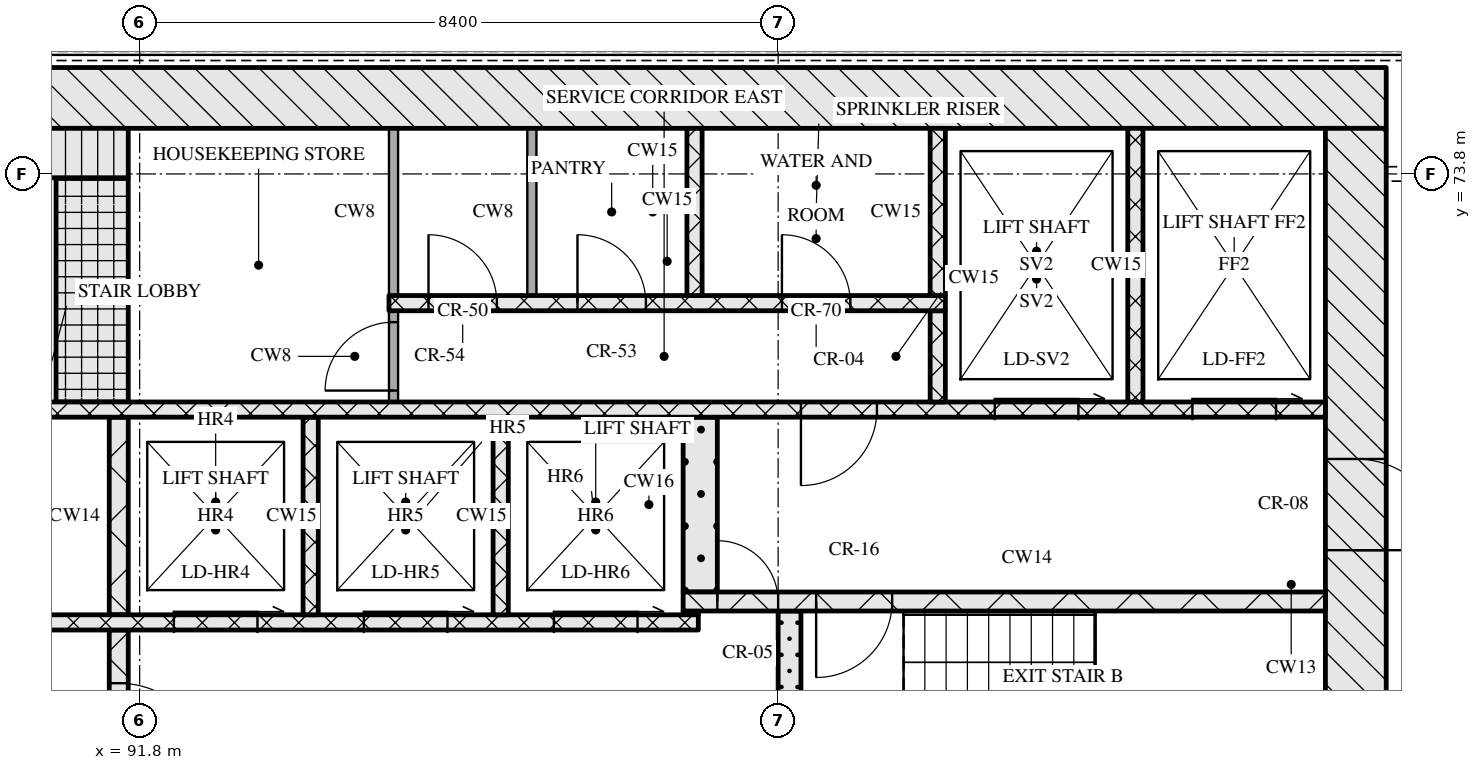
"""IFC4 building model, lengths in metres.
Left out: names, types, materials, properties, quantities, classifications, styles, units other than length and angle.
Written with IfcOpenShell. Run it as: python <this file> out.ifc"""

import sys

from ifc_helpers import new_model, si_unit, direction, frame, frame_2d, origin, place, context, subcontext, project, spatial, rectangle, extrude, element, fill, save


model = new_model("IFC4")
c1 = context("Model", 3, precision=1e-05, world=origin(), true_north=direction((0.0, 1.0)))
c2 = subcontext(c1, "Body", "Model", "MODEL_VIEW")
j1 = project(units=[si_unit("LENGTHUNIT", "METRE"), si_unit("PLANEANGLEUNIT", "RADIAN")], contexts=[c1])
p1 = place(None, origin())
s1 = spatial("IfcSite", under=j1, at=p1, CompositionType="ELEMENT")
p2 = place(p1, origin())
s2 = spatial("IfcBuilding", under=s1, at=p2, CompositionType="ELEMENT")
p3 = place(p2, frame((0.0, 0.0, 172.65)))
s3 = spatial("IfcBuildingStorey", under=s2, at=p3, CompositionType="ELEMENT", Elevation=172.65)
p4 = place(p3, frame((67.0, 74.8, 0.0), z_axis=(0.0, 0.0, 1.0), x_axis=(1.0, 0.0, 0.0)))
e1 = element("IfcWall", 1, at=p4, inside=s3, PredefinedType="SOLIDWALL", context=c2, shape_type="SweptSolid", body=[
    extrude(rectangle(XDim=41.2, YDim=0.8, at=frame_2d((20.6, 0.0))), origin(), (0.0, 0.0, 1.0), 3.32),
])
p5 = place(p3, frame((107.8, 62.4, 0.0), z_axis=(0.0, 0.0, 1.0), x_axis=(0.0, 1.0, 0.0)))
e2 = element("IfcWall", 2, at=p5, inside=s3, PredefinedType="SOLIDWALL", context=c2, shape_type="SweptSolid", body=[
    extrude(rectangle(XDim=12.0, YDim=0.8, at=frame_2d((6.0, 0.0))), origin(), (0.0, 0.0, 1.0), 3.32),
])
p6 = place(p5, frame((6.45, 0.0, 0.0)))
e3 = element("IfcOpeningElement", 3, at=p6, cuts=e2, PredefinedType="OPENING", context=c2, shape_type="SweptSolid", body=[
    extrude(rectangle(XDim=1.2, YDim=2.1, at=frame_2d((0.6, 1.05))), frame((0.0, 0.41, 0.0), z_axis=(0.0, -1.0, 0.0), x_axis=(1.0, 0.0, 0.0)), (0.0, 0.0, 1.0), 0.82),
])
p7 = place(p3, frame((91.525, 65.2, 0.0), z_axis=(0.0, 0.0, 1.0), x_axis=(0.0, 1.0, 0.0)))
e4 = element("IfcWall", 4, at=p7, inside=s3, PredefinedType="SOLIDWALL", context=c2, shape_type="SweptSolid", body=[
    extrude(rectangle(XDim=2.6, YDim=0.25, at=frame_2d((1.3, 0.0))), origin(), (0.0, 0.0, 1.0), 3.32),
])
p8 = place(p7, frame((0.7, 0.0, 0.0)))
e5 = element("IfcOpeningElement", 5, at=p8, cuts=e4, PredefinedType="OPENING", context=c2, shape_type="SweptSolid", body=[
    extrude(rectangle(XDim=1.2, YDim=2.1, at=frame_2d((0.6, 1.05))), frame((0.0, 0.135, 0.0), z_axis=(0.0, -1.0, 0.0), x_axis=(1.0, 0.0, 0.0)), (0.0, 0.0, 1.0), 0.27),
])
p9 = place(p3, frame((100.35, 65.2, 0.0), z_axis=(0.0, 0.0, 1.0), x_axis=(0.0, 1.0, 0.0)))
e6 = element("IfcWall", 6, at=p9, inside=s3, PredefinedType="SOLIDWALL", context=c2, shape_type="SweptSolid", body=[
    extrude(rectangle(XDim=2.85, YDim=0.3, at=frame_2d((1.425, 0.0))), origin(), (0.0, 0.0, 1.0), 3.32),
])
p10 = place(p3, frame((76.05, 67.9, 0.0), z_axis=(0.0, 0.0, 1.0), x_axis=(1.0, 0.0, 0.0)))
e7 = element("IfcWall", 7, at=p10, inside=s3, PredefinedType="SOLIDWALL", context=c2, shape_type="SweptSolid", body=[
    extrude(rectangle(XDim=23.1, YDim=0.2, at=frame_2d((11.55, 0.0))), origin(), (0.0, 0.0, 1.0), 3.32),
])
p11 = place(p10, frame((1.35, 0.0, 0.0)))
e8 = element("IfcOpeningElement", 8, at=p11, cuts=e7, PredefinedType="OPENING", context=c2, shape_type="SweptSolid", body=[
    extrude(rectangle(XDim=0.9, YDim=2.1, at=frame_2d((0.45, 1.05))), frame((0.0, 0.11, 0.0), z_axis=(0.0, -1.0, 0.0), x_axis=(1.0, 0.0, 0.0)), (0.0, 0.0, 1.0), 0.22),
])
p12 = place(p10, frame((5.06, 0.0, 0.0)))
e9 = element("IfcOpeningElement", 9, at=p12, cuts=e7, PredefinedType="OPENING", context=c2, shape_type="SweptSolid", body=[
    extrude(rectangle(XDim=0.9, YDim=2.1, at=frame_2d((0.45, 1.05))), frame((0.0, 0.11, 0.0), z_axis=(0.0, -1.0, 0.0), x_axis=(1.0, 0.0, 0.0)), (0.0, 0.0, 1.0), 0.22),
])
p13 = place(p10, frame((8.45, 0.0, 0.0)))
e10 = element("IfcOpeningElement", 10, at=p13, cuts=e7, PredefinedType="OPENING", context=c2, shape_type="SweptSolid", body=[
    extrude(rectangle(XDim=0.9, YDim=2.1, at=frame_2d((0.45, 1.05))), frame((0.0, 0.11, 0.0), z_axis=(0.0, -1.0, 0.0), x_axis=(1.0, 0.0, 0.0)), (0.0, 0.0, 1.0), 0.22),
])
p14 = place(p10, frame((10.91, 0.0, 0.0)))
e11 = element("IfcOpeningElement", 11, at=p14, cuts=e7, PredefinedType="OPENING", context=c2, shape_type="SweptSolid", body=[
    extrude(rectangle(XDim=0.9, YDim=2.1, at=frame_2d((0.45, 1.05))), frame((0.0, 0.11, 0.0), z_axis=(0.0, -1.0, 0.0), x_axis=(1.0, 0.0, 0.0)), (0.0, 0.0, 1.0), 0.22),
])
p15 = place(p10, frame((13.55, 0.0, 0.0)))
e12 = element("IfcOpeningElement", 12, at=p15, cuts=e7, PredefinedType="OPENING", context=c2, shape_type="SweptSolid", body=[
    extrude(rectangle(XDim=1.0, YDim=2.1, at=frame_2d((0.5, 1.05))), frame((0.0, 0.11, 0.0), z_axis=(0.0, -1.0, 0.0), x_axis=(1.0, 0.0, 0.0)), (0.0, 0.0, 1.0), 0.22),
])
p16 = place(p10, frame((16.2, 0.0, 0.0)))
e13 = element("IfcOpeningElement", 13, at=p16, cuts=e7, PredefinedType="OPENING", context=c2, shape_type="SweptSolid", body=[
    extrude(rectangle(XDim=1.1, YDim=2.1, at=frame_2d((0.55, 1.05))), frame((0.0, 0.11, 0.0), z_axis=(0.0, -1.0, 0.0), x_axis=(1.0, 0.0, 0.0)), (0.0, 0.0, 1.0), 0.22),
])
p17 = place(p10, frame((18.7, 0.0, 0.0)))
e14 = element("IfcOpeningElement", 14, at=p17, cuts=e7, PredefinedType="OPENING", context=c2, shape_type="SweptSolid", body=[
    extrude(rectangle(XDim=1.1, YDim=2.1, at=frame_2d((0.55, 1.05))), frame((0.0, 0.11, 0.0), z_axis=(0.0, -1.0, 0.0), x_axis=(1.0, 0.0, 0.0)), (0.0, 0.0, 1.0), 0.22),
])
p18 = place(p10, frame((21.2, 0.0, 0.0)))
e15 = element("IfcOpeningElement", 15, at=p18, cuts=e7, PredefinedType="OPENING", context=c2, shape_type="SweptSolid", body=[
    extrude(rectangle(XDim=1.1, YDim=2.1, at=frame_2d((0.55, 1.05))), frame((0.0, 0.11, 0.0), z_axis=(0.0, -1.0, 0.0), x_axis=(1.0, 0.0, 0.0)), (0.0, 0.0, 1.0), 0.22),
])
p19 = place(p3, frame((91.525, 68.0, 0.0), z_axis=(0.0, 0.0, 1.0), x_axis=(0.0, 1.0, 0.0)))
e16 = element("IfcWall", 16, at=p19, inside=s3, PredefinedType="SOLIDWALL", context=c2, shape_type="SweptSolid", body=[
    extrude(rectangle(XDim=2.6, YDim=0.25, at=frame_2d((1.3, 0.0))), origin(), (0.0, 0.0, 1.0), 3.32),
])
for number, where, z_axis, x_axis in (
    (17, (94.05, 68.0, 0.0), (0.0, 0.0, 1.0), (0.0, 1.0, 0.0)),
    (18, (96.55, 68.0, 0.0), (0.0, 0.0, 1.0), (0.0, 1.0, 0.0)),
):
    element("IfcWall", number, at=place(p3, frame(where, z_axis=z_axis, x_axis=x_axis)), inside=s3, PredefinedType="SOLIDWALL", context=c2, shape_type="SweptSolid", body=[
        extrude(rectangle(XDim=2.6, YDim=0.2, at=frame_2d((1.3, 0.0))), origin(), (0.0, 0.0, 1.0), 3.32),
    ])
p20 = place(p3, frame((98.95, 68.025, 0.0), z_axis=(0.0, 0.0, 1.0), x_axis=(1.0, 0.0, 0.0)))
e19 = element("IfcWall", 19, at=p20, inside=s3, PredefinedType="SOLIDWALL", context=c2, shape_type="SweptSolid", body=[
    extrude(rectangle(XDim=0.2, YDim=0.05, at=frame_2d((0.1, 0.0))), origin(), (0.0, 0.0, 1.0), 3.32),
])
p21 = place(p3, frame((98.95, 68.175, 0.0), z_axis=(0.0, 0.0, 1.0), x_axis=(1.0, 0.0, 0.0)))
e20 = element("IfcWall", 20, at=p21, inside=s3, PredefinedType="SOLIDWALL", context=c2, shape_type="SweptSolid", body=[
    extrude(rectangle(XDim=8.45, YDim=0.25, at=frame_2d((4.225, 0.0))), origin(), (0.0, 0.0, 1.0), 3.32),
])
p22 = place(p21, frame((0.45, 0.0, 0.0)))
e21 = element("IfcOpeningElement", 21, at=p22, cuts=e20, PredefinedType="OPENING", context=c2, shape_type="SweptSolid", body=[
    extrude(rectangle(XDim=0.8, YDim=2.1, at=frame_2d((0.4, 1.05))), frame((0.0, 0.135, 0.0), z_axis=(0.0, -1.0, 0.0), x_axis=(1.0, 0.0, 0.0)), (0.0, 0.0, 1.0), 0.27),
])
p23 = place(p21, frame((1.75, 0.0, 0.0)))
e22 = element("IfcOpeningElement", 22, at=p23, cuts=e20, PredefinedType="OPENING", context=c2, shape_type="SweptSolid", body=[
    extrude(rectangle(XDim=1.0, YDim=2.1, at=frame_2d((0.5, 1.05))), frame((0.0, 0.135, 0.0), z_axis=(0.0, -1.0, 0.0), x_axis=(1.0, 0.0, 0.0)), (0.0, 0.0, 1.0), 0.27),
])
p24 = place(p3, frame((99.175, 68.3, 0.0), z_axis=(0.0, 0.0, 1.0), x_axis=(0.0, 1.0, 0.0)))
e23 = element("IfcWall", 23, at=p24, inside=s3, PredefinedType="SOLIDWALL", context=c2, shape_type="SweptSolid", body=[
    extrude(rectangle(XDim=2.3, YDim=0.45, at=frame_2d((1.15, 0.0))), origin(), (0.0, 0.0, 1.0), 3.32),
])
p25 = place(p3, frame((67.8, 70.7, 0.0), z_axis=(0.0, 0.0, 1.0), x_axis=(1.0, 0.0, 0.0)))
e24 = element("IfcWall", 24, at=p25, inside=s3, PredefinedType="SOLIDWALL", context=c2, shape_type="SweptSolid", body=[
    extrude(rectangle(XDim=39.6, YDim=0.2, at=frame_2d((19.8, 0.0))), origin(), (0.0, 0.0, 1.0), 3.32),
])
p26 = place(p25, frame((0.65, 0.0, 0.0)))
e25 = element("IfcOpeningElement", 25, at=p26, cuts=e24, PredefinedType="OPENING", context=c2, shape_type="SweptSolid", body=[
    extrude(rectangle(XDim=1.1, YDim=2.1, at=frame_2d((0.55, 1.05))), frame((0.0, 0.11, 0.0), z_axis=(0.0, -1.0, 0.0), x_axis=(1.0, 0.0, 0.0)), (0.0, 0.0, 1.0), 0.22),
])
p27 = place(p25, frame((3.25, 0.0, 0.0)))
e26 = element("IfcOpeningElement", 26, at=p27, cuts=e24, PredefinedType="OPENING", context=c2, shape_type="SweptSolid", body=[
    extrude(rectangle(XDim=1.1, YDim=2.1, at=frame_2d((0.55, 1.05))), frame((0.0, 0.11, 0.0), z_axis=(0.0, -1.0, 0.0), x_axis=(1.0, 0.0, 0.0)), (0.0, 0.0, 1.0), 0.22),
])
p28 = place(p25, frame((5.9, 0.0, 0.0)))
e27 = element("IfcOpeningElement", 27, at=p28, cuts=e24, PredefinedType="OPENING", context=c2, shape_type="SweptSolid", body=[
    extrude(rectangle(XDim=1.0, YDim=2.1, at=frame_2d((0.5, 1.05))), frame((0.0, 0.11, 0.0), z_axis=(0.0, -1.0, 0.0), x_axis=(1.0, 0.0, 0.0)), (0.0, 0.0, 1.0), 0.22),
])
p29 = place(p25, frame((21.7, 0.0, 0.0)))
e28 = element("IfcOpeningElement", 28, at=p29, cuts=e24, PredefinedType="OPENING", context=c2, shape_type="SweptSolid", body=[
    extrude(rectangle(XDim=1.0, YDim=2.1, at=frame_2d((0.5, 1.05))), frame((0.0, 0.11, 0.0), z_axis=(0.0, -1.0, 0.0), x_axis=(1.0, 0.0, 0.0)), (0.0, 0.0, 1.0), 0.22),
])
p30 = place(p25, frame((32.7, 0.0, 0.0)))
e29 = element("IfcOpeningElement", 29, at=p30, cuts=e24, PredefinedType="OPENING", context=c2, shape_type="SweptSolid", body=[
    extrude(rectangle(XDim=1.0, YDim=2.1, at=frame_2d((0.5, 1.05))), frame((0.0, 0.11, 0.0), z_axis=(0.0, -1.0, 0.0), x_axis=(1.0, 0.0, 0.0)), (0.0, 0.0, 1.0), 0.22),
])
p31 = place(p25, frame((35.25, 0.0, 0.0)))
e30 = element("IfcOpeningElement", 30, at=p31, cuts=e24, PredefinedType="OPENING", context=c2, shape_type="SweptSolid", body=[
    extrude(rectangle(XDim=1.1, YDim=2.1, at=frame_2d((0.55, 1.05))), frame((0.0, 0.11, 0.0), z_axis=(0.0, -1.0, 0.0), x_axis=(1.0, 0.0, 0.0)), (0.0, 0.0, 1.0), 0.22),
])
p32 = place(p25, frame((37.85, 0.0, 0.0)))
e31 = element("IfcOpeningElement", 31, at=p32, cuts=e24, PredefinedType="OPENING", context=c2, shape_type="SweptSolid", body=[
    extrude(rectangle(XDim=1.1, YDim=2.1, at=frame_2d((0.55, 1.05))), frame((0.0, 0.11, 0.0), z_axis=(0.0, -1.0, 0.0), x_axis=(1.0, 0.0, 0.0)), (0.0, 0.0, 1.0), 0.22),
])
p33 = place(p3, frame((91.175, 70.8, 0.0), z_axis=(0.0, 0.0, 1.0), x_axis=(0.0, 1.0, 0.0)))
e32 = element("IfcWall", 32, at=p33, inside=s3, PredefinedType="SOLIDWALL", context=c2, shape_type="SweptSolid", body=[
    extrude(rectangle(XDim=2.95, YDim=0.95, at=frame_2d((1.475, 0.0))), origin(), (0.0, 0.0, 1.0), 3.32),
])
p34 = place(p3, frame((95.14, 70.8, 0.0), z_axis=(0.0, 0.0, 1.0), x_axis=(0.0, 1.0, 0.0)))
e33 = element("IfcWall", 33, at=p34, inside=s3, PredefinedType="PARTITIONING", context=c2, shape_type="SweptSolid", body=[
    extrude(rectangle(XDim=1.2, YDim=0.12, at=frame_2d((0.6, 0.0))), origin(), (0.0, 0.0, 1.0), 3.32),
])
p35 = place(p34, frame((0.15, 0.0, 0.0)))
e34 = element("IfcOpeningElement", 34, at=p35, cuts=e33, PredefinedType="OPENING", context=c2, shape_type="SweptSolid", body=[
    extrude(rectangle(XDim=0.9, YDim=2.1, at=frame_2d((0.45, 1.05))), frame((0.0, 0.07, 0.0), z_axis=(0.0, -1.0, 0.0), x_axis=(1.0, 0.0, 0.0)), (0.0, 0.0, 1.0), 0.14),
])
p36 = place(p3, frame((102.3, 70.8, 0.0), z_axis=(0.0, 0.0, 1.0), x_axis=(0.0, 1.0, 0.0)))
e35 = element("IfcWall", 35, at=p36, inside=s3, PredefinedType="SOLIDWALL", context=c2, shape_type="SweptSolid", body=[
    extrude(rectangle(XDim=1.2, YDim=0.2, at=frame_2d((0.6, 0.0))), origin(), (0.0, 0.0, 1.0), 3.32),
])
p37 = place(p3, frame((104.9, 70.8, 0.0), z_axis=(0.0, 0.0, 1.0), x_axis=(0.0, 1.0, 0.0)))
e36 = element("IfcWall", 36, at=p37, inside=s3, PredefinedType="SOLIDWALL", context=c2, shape_type="SweptSolid", body=[
    extrude(rectangle(XDim=3.6, YDim=0.2, at=frame_2d((1.8, 0.0))), origin(), (0.0, 0.0, 1.0), 3.32),
])
p38 = place(p3, frame((95.08, 72.1, 0.0), z_axis=(0.0, 0.0, 1.0), x_axis=(1.0, 0.0, 0.0)))
e37 = element("IfcWall", 37, at=p38, inside=s3, PredefinedType="SOLIDWALL", context=c2, shape_type="SweptSolid", body=[
    extrude(rectangle(XDim=7.32, YDim=0.2, at=frame_2d((3.66, 0.0))), origin(), (0.0, 0.0, 1.0), 3.32),
])
p39 = place(p38, frame((0.52, 0.0, 0.0)))
e38 = element("IfcOpeningElement", 38, at=p39, cuts=e37, PredefinedType="OPENING", context=c2, shape_type="SweptSolid", body=[
    extrude(rectangle(XDim=0.9, YDim=2.1, at=frame_2d((0.45, 1.05))), frame((0.0, 0.11, 0.0), z_axis=(0.0, -1.0, 0.0), x_axis=(1.0, 0.0, 0.0)), (0.0, 0.0, 1.0), 0.22),
])
p40 = place(p38, frame((2.48, 0.0, 0.0)))
e39 = element("IfcOpeningElement", 39, at=p40, cuts=e37, PredefinedType="OPENING", context=c2, shape_type="SweptSolid", body=[
    extrude(rectangle(XDim=0.9, YDim=2.1, at=frame_2d((0.45, 1.05))), frame((0.0, 0.11, 0.0), z_axis=(0.0, -1.0, 0.0), x_axis=(1.0, 0.0, 0.0)), (0.0, 0.0, 1.0), 0.22),
])
p41 = place(p38, frame((5.17, 0.0, 0.0)))
e40 = element("IfcOpeningElement", 40, at=p41, cuts=e37, PredefinedType="OPENING", context=c2, shape_type="SweptSolid", body=[
    extrude(rectangle(XDim=0.9, YDim=2.1, at=frame_2d((0.45, 1.05))), frame((0.0, 0.11, 0.0), z_axis=(0.0, -1.0, 0.0), x_axis=(1.0, 0.0, 0.0)), (0.0, 0.0, 1.0), 0.22),
])
for number, where, z_axis, x_axis in (
    (41, (95.14, 72.2, 0.0), (0.0, 0.0, 1.0), (0.0, 1.0, 0.0)),
    (42, (96.96, 72.2, 0.0), (0.0, 0.0, 1.0), (0.0, 1.0, 0.0)),
):
    element("IfcWall", number, at=place(p3, frame(where, z_axis=z_axis, x_axis=x_axis)), inside=s3, PredefinedType="PARTITIONING", context=c2, shape_type="SweptSolid", body=[
        extrude(rectangle(XDim=2.2, YDim=0.12, at=frame_2d((1.1, 0.0))), origin(), (0.0, 0.0, 1.0), 3.32),
    ])
for number, where, z_axis, x_axis in (
    (43, (99.1, 72.2, 0.0), (0.0, 0.0, 1.0), (0.0, 1.0, 0.0)),
    (44, (102.3, 72.2, 0.0), (0.0, 0.0, 1.0), (0.0, 1.0, 0.0)),
):
    element("IfcWall", number, at=place(p3, frame(where, z_axis=z_axis, x_axis=x_axis)), inside=s3, PredefinedType="SOLIDWALL", context=c2, shape_type="SweptSolid", body=[
        extrude(rectangle(XDim=2.2, YDim=0.2, at=frame_2d((1.1, 0.0))), origin(), (0.0, 0.0, 1.0), 3.32),
    ])
p42 = place(p3, frame((83.55, 74.075, 0.0), z_axis=(0.0, 0.0, 1.0), x_axis=(1.0, 0.0, 0.0)))
e45 = element("IfcWall", 45, at=p42, inside=s3, PredefinedType="SOLIDWALL", context=c2, shape_type="SweptSolid", body=[
    extrude(rectangle(XDim=8.1, YDim=0.65, at=frame_2d((4.05, 0.0))), origin(), (0.0, 0.0, 1.0), 3.32),
])
p43 = place(p8, origin())
e46 = element("IfcDoor", 46, at=p43, inside=s3, OperationType="SINGLE_SWING_RIGHT", PredefinedType="DOOR", context=c2, shape_type="SweptSolid", body=[
    extrude(rectangle(XDim=1.2, YDim=2.1, at=frame_2d((0.6, 1.05))), frame((0.0, 0.025, 0.0), z_axis=(0.0, -1.0, 0.0), x_axis=(1.0, 0.0, 0.0)), (0.0, 0.0, 1.0), 0.05),
])
fill(e5, e46)
p44 = place(p16, origin())
e47 = element("IfcDoor", 47, at=p44, inside=s3, OperationType="SLIDING_TO_RIGHT", PredefinedType="DOOR", context=c2, shape_type="SweptSolid", body=[
    extrude(rectangle(XDim=1.1, YDim=2.1, at=frame_2d((0.55, 1.05))), frame((0.0, 0.025, 0.0), z_axis=(0.0, -1.0, 0.0), x_axis=(1.0, 0.0, 0.0)), (0.0, 0.0, 1.0), 0.05),
])
fill(e13, e47)
p45 = place(p17, origin())
e48 = element("IfcDoor", 48, at=p45, inside=s3, OperationType="SLIDING_TO_RIGHT", PredefinedType="DOOR", context=c2, shape_type="SweptSolid", body=[
    extrude(rectangle(XDim=1.1, YDim=2.1, at=frame_2d((0.55, 1.05))), frame((0.0, 0.025, 0.0), z_axis=(0.0, -1.0, 0.0), x_axis=(1.0, 0.0, 0.0)), (0.0, 0.0, 1.0), 0.05),
])
fill(e14, e48)
p46 = place(p18, origin())
e49 = element("IfcDoor", 49, at=p46, inside=s3, OperationType="SLIDING_TO_RIGHT", PredefinedType="DOOR", context=c2, shape_type="SweptSolid", body=[
    extrude(rectangle(XDim=1.1, YDim=2.1, at=frame_2d((0.55, 1.05))), frame((0.0, 0.025, 0.0), z_axis=(0.0, -1.0, 0.0), x_axis=(1.0, 0.0, 0.0)), (0.0, 0.0, 1.0), 0.05),
])
fill(e15, e49)
p47 = place(p22, origin())
e50 = element("IfcDoor", 50, at=p47, inside=s3, OperationType="SINGLE_SWING_LEFT", PredefinedType="DOOR", context=c2, shape_type="SweptSolid", body=[
    extrude(rectangle(XDim=0.8, YDim=2.1, at=frame_2d((0.4, 1.05))), frame((0.0, 0.025, 0.0), z_axis=(0.0, -1.0, 0.0), x_axis=(1.0, 0.0, 0.0)), (0.0, 0.0, 1.0), 0.05),
])
fill(e21, e50)
p48 = place(p23, origin())
e51 = element("IfcDoor", 51, at=p48, inside=s3, OperationType="SINGLE_SWING_RIGHT", PredefinedType="DOOR", context=c2, shape_type="SweptSolid", body=[
    extrude(rectangle(XDim=1.0, YDim=2.1, at=frame_2d((0.5, 1.05))), frame((0.0, 0.025, 0.0), z_axis=(0.0, -1.0, 0.0), x_axis=(1.0, 0.0, 0.0)), (0.0, 0.0, 1.0), 0.05),
])
fill(e22, e51)
p49 = place(p6, origin())
e52 = element("IfcDoor", 52, at=p49, inside=s3, OperationType="SINGLE_SWING_RIGHT", PredefinedType="DOOR", context=c2, shape_type="SweptSolid", body=[
    extrude(rectangle(XDim=1.2, YDim=2.1, at=frame_2d((0.6, 1.05))), frame((0.0, 0.025, 0.0), z_axis=(0.0, -1.0, 0.0), x_axis=(1.0, 0.0, 0.0)), (0.0, 0.0, 1.0), 0.05),
])
fill(e3, e52)
p50 = place(p30, origin())
e53 = element("IfcDoor", 53, at=p50, inside=s3, OperationType="SINGLE_SWING_RIGHT", PredefinedType="DOOR", context=c2, shape_type="SweptSolid", body=[
    extrude(rectangle(XDim=1.0, YDim=2.1, at=frame_2d((0.5, 1.05))), frame((0.0, 0.025, 0.0), z_axis=(0.0, -1.0, 0.0), x_axis=(1.0, 0.0, 0.0)), (0.0, 0.0, 1.0), 0.05),
])
fill(e29, e53)
p51 = place(p31, origin())
e54 = element("IfcDoor", 54, at=p51, inside=s3, OperationType="SLIDING_TO_RIGHT", PredefinedType="DOOR", context=c2, shape_type="SweptSolid", body=[
    extrude(rectangle(XDim=1.1, YDim=2.1, at=frame_2d((0.55, 1.05))), frame((0.0, 0.025, 0.0), z_axis=(0.0, -1.0, 0.0), x_axis=(1.0, 0.0, 0.0)), (0.0, 0.0, 1.0), 0.05),
])
fill(e30, e54)
p52 = place(p32, origin())
e55 = element("IfcDoor", 55, at=p52, inside=s3, OperationType="SLIDING_TO_RIGHT", PredefinedType="DOOR", context=c2, shape_type="SweptSolid", body=[
    extrude(rectangle(XDim=1.1, YDim=2.1, at=frame_2d((0.55, 1.05))), frame((0.0, 0.025, 0.0), z_axis=(0.0, -1.0, 0.0), x_axis=(1.0, 0.0, 0.0)), (0.0, 0.0, 1.0), 0.05),
])
fill(e31, e55)
p53 = place(p35, origin())
e56 = element("IfcDoor", 56, at=p53, inside=s3, OperationType="SINGLE_SWING_LEFT", PredefinedType="DOOR", context=c2, shape_type="SweptSolid", body=[
    extrude(rectangle(XDim=0.9, YDim=2.1, at=frame_2d((0.45, 1.05))), frame((0.0, 0.025, 0.0), z_axis=(0.0, -1.0, 0.0), x_axis=(1.0, 0.0, 0.0)), (0.0, 0.0, 1.0), 0.05),
])
fill(e34, e56)
p54 = place(p39, origin())
e57 = element("IfcDoor", 57, at=p54, inside=s3, OperationType="SINGLE_SWING_LEFT", PredefinedType="DOOR", context=c2, shape_type="SweptSolid", body=[
    extrude(rectangle(XDim=0.9, YDim=2.1, at=frame_2d((0.45, 1.05))), frame((0.0, 0.025, 0.0), z_axis=(0.0, -1.0, 0.0), x_axis=(1.0, 0.0, 0.0)), (0.0, 0.0, 1.0), 0.05),
])
fill(e38, e57)
p55 = place(p40, origin())
e58 = element("IfcDoor", 58, at=p55, inside=s3, OperationType="SINGLE_SWING_LEFT", PredefinedType="DOOR", context=c2, shape_type="SweptSolid", body=[
    extrude(rectangle(XDim=0.9, YDim=2.1, at=frame_2d((0.45, 1.05))), frame((0.0, 0.025, 0.0), z_axis=(0.0, -1.0, 0.0), x_axis=(1.0, 0.0, 0.0)), (0.0, 0.0, 1.0), 0.05),
])
fill(e39, e58)
p56 = place(p41, origin())
e59 = element("IfcDoor", 59, at=p56, inside=s3, OperationType="SINGLE_SWING_LEFT", PredefinedType="DOOR", context=c2, shape_type="SweptSolid", body=[
    extrude(rectangle(XDim=0.9, YDim=2.1, at=frame_2d((0.45, 1.05))), frame((0.0, 0.025, 0.0), z_axis=(0.0, -1.0, 0.0), x_axis=(1.0, 0.0, 0.0)), (0.0, 0.0, 1.0), 0.05),
])
fill(e40, e59)
save(model, sys.argv[1])
